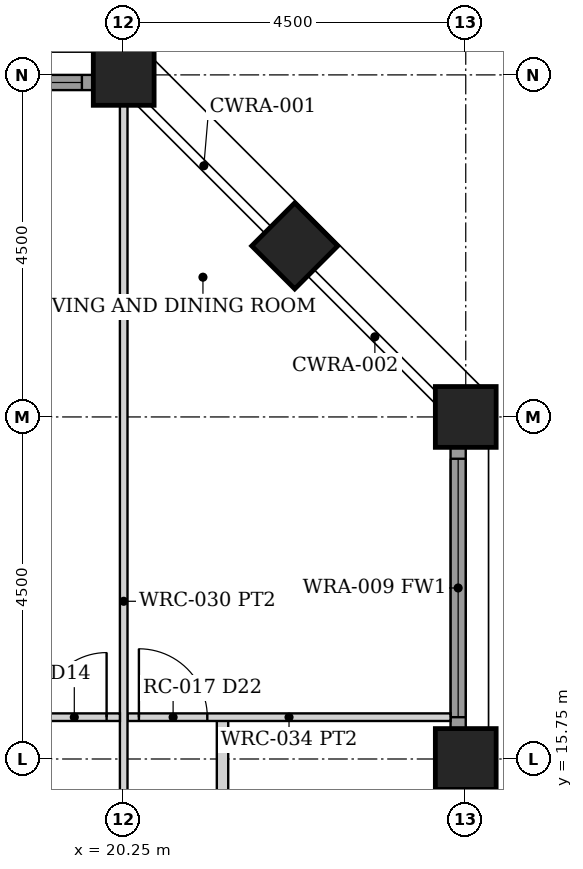
"""IFC4 building model, lengths in metres.
Left out: names, types, materials, properties, quantities, classifications, styles, units other than length and angle.
Written with IfcOpenShell. Run it as: python <this file> out.ifc"""

import sys

from ifc_helpers import new_model, si_unit, direction, frame, frame_2d, origin, origin_2d, place, context, subcontext, project, spatial, rectangle, hollow_rectangle, extrude, element, fill, save


model = new_model("IFC4")
c1 = context("Model", 3, precision=1e-05, world=origin(), true_north=direction((0.0, 1.0)))
c2 = subcontext(c1, "Body", "Model", "MODEL_VIEW")
j1 = project(units=[si_unit("LENGTHUNIT", "METRE"), si_unit("PLANEANGLEUNIT", "RADIAN")], contexts=[c1])
p1 = place(None, origin())
s1 = spatial("IfcSite", under=j1, at=p1, CompositionType="ELEMENT")
p2 = place(p1, origin())
s2 = spatial("IfcBuilding", under=s1, at=p2, CompositionType="ELEMENT")
p3 = place(p2, frame((0.0, 0.0, 47.5)))
s3 = spatial("IfcBuildingStorey", under=s2, at=p3, CompositionType="ELEMENT", Elevation=47.5)
for number, where, z_axis, x_axis in (
    (1, (24.75, 15.75, 0.0), (0.0, 0.0, 1.0), (1.0, 0.0, 0.0)),
    (2, (20.25, 24.75, 0.0), (0.0, 0.0, 1.0), (0.0, 1.0, 0.0)),
    (3, (24.75, 20.25, 0.0), (0.0, 0.0, 1.0), (1.0, 0.0, 0.0)),
    (4, (22.5, 22.5, 0.0), (0.0, 0.0, 1.0), (0.707, 0.707, 0.0)),
):
    element("IfcColumn", number, at=place(p3, frame(where, z_axis=z_axis, x_axis=x_axis)), inside=s3, PredefinedType="COLUMN", context=c2, shape_type="SweptSolid", body=[
        extrude(hollow_rectangle(XDim=0.8, YDim=0.8, WallThickness=0.07, at=origin_2d()), origin(), (0.0, 0.0, 1.0), 3.5),
    ])
p4 = place(p3, frame((24.65, 16.155, 0.0), z_axis=(0.0, 0.0, 1.0), x_axis=(0.0, 1.0, 0.0)))
e5 = element("IfcWall", 5, at=p4, inside=s3, PredefinedType="SOLIDWALL", context=c2, shape_type="SweptSolid", body=[
    extrude(rectangle(XDim=3.69, YDim=0.2, at=frame_2d((1.845, 0.0))), origin(), (0.0, 0.0, 1.0), 2.379),
])
p5 = place(p4, frame((0.145, 0.0, 0.3)))
e6 = element("IfcOpeningElement", 6, at=p5, cuts=e5, PredefinedType="OPENING", context=c2, shape_type="SweptSolid", body=[
    extrude(rectangle(XDim=3.4, YDim=1.929, at=frame_2d((1.7, 0.964))), frame((0.0, 0.11, 0.0), z_axis=(0.0, -1.0, 0.0), x_axis=(1.0, 0.0, 0.0)), (0.0, 0.0, 1.0), 0.22),
])
p6 = place(p3, frame((16.155, 24.65, 0.0), z_axis=(0.0, 0.0, 1.0), x_axis=(1.0, 0.0, 0.0)))
e7 = element("IfcWall", 7, at=p6, inside=s3, PredefinedType="SOLIDWALL", context=c2, shape_type="SweptSolid", body=[
    extrude(rectangle(XDim=3.69, YDim=0.2, at=frame_2d((1.845, 0.0))), origin(), (0.0, 0.0, 1.0), 2.379),
])
p7 = place(p6, frame((0.145, 0.0, 0.3)))
e8 = element("IfcOpeningElement", 8, at=p7, cuts=e7, PredefinedType="OPENING", context=c2, shape_type="SweptSolid", body=[
    extrude(rectangle(XDim=3.4, YDim=1.929, at=frame_2d((1.7, 0.964))), frame((0.0, 0.11, 0.0), z_axis=(0.0, -1.0, 0.0), x_axis=(1.0, 0.0, 0.0)), (0.0, 0.0, 1.0), 0.22),
])
p8 = place(p3, frame((21.55, 11.3, 0.0), z_axis=(0.0, 0.0, 1.0), x_axis=(0.0, 1.0, 0.0)))
e9 = element("IfcWall", 9, at=p8, inside=s3, PredefinedType="PARTITIONING", context=c2, shape_type="SweptSolid", body=[
    extrude(rectangle(XDim=5.0, YDim=0.15, at=frame_2d((2.5, 0.0))), origin(), (0.0, 0.0, 1.0), 2.373),
])
p9 = place(p8, frame((2.05, 0.0, 0.0)))
e10 = element("IfcOpeningElement", 10, at=p9, cuts=e9, PredefinedType="OPENING", context=c2, shape_type="SweptSolid", body=[
    extrude(rectangle(XDim=0.9, YDim=2.1, at=frame_2d((0.45, 1.05))), frame((0.0, 0.085, 0.0), z_axis=(0.0, -1.0, 0.0), x_axis=(1.0, 0.0, 0.0)), (0.0, 0.0, 1.0), 0.17),
])
p10 = place(p3, frame((20.3, 16.3, 0.0), z_axis=(0.0, 0.0, 1.0), x_axis=(1.0, 0.0, 0.0)))
e11 = element("IfcWall", 11, at=p10, inside=s3, PredefinedType="PARTITIONING", context=c2, shape_type="SweptSolid", body=[
    extrude(rectangle(XDim=4.25, YDim=0.1, at=frame_2d((2.125, 0.0))), origin(), (0.0, 0.0, 1.0), 2.373),
])
p11 = place(p10, frame((0.15, 0.0, 0.0)))
e12 = element("IfcOpeningElement", 12, at=p11, cuts=e11, PredefinedType="OPENING", context=c2, shape_type="SweptSolid", body=[
    extrude(rectangle(XDim=0.9, YDim=2.1, at=frame_2d((0.45, 1.05))), frame((0.0, 0.06, 0.0), z_axis=(0.0, -1.0, 0.0), x_axis=(1.0, 0.0, 0.0)), (0.0, 0.0, 1.0), 0.12),
])
p12 = place(p3, frame((20.25, 11.3, 0.0), z_axis=(0.0, 0.0, 1.0), x_axis=(0.0, 1.0, 0.0)))
e13 = element("IfcWall", 13, at=p12, inside=s3, PredefinedType="PARTITIONING", context=c2, shape_type="SweptSolid", body=[
    extrude(rectangle(XDim=13.05, YDim=0.1, at=frame_2d((6.525, 0.0))), origin(), (0.0, 0.0, 1.0), 2.373),
])
p13 = place(p3, frame((15.81, 16.3, 0.0), z_axis=(0.0, 0.0, 1.0), x_axis=(1.0, 0.0, 0.0)))
e14 = element("IfcWall", 14, at=p13, inside=s3, PredefinedType="PARTITIONING", context=c2, shape_type="SweptSolid", body=[
    extrude(rectangle(XDim=4.39, YDim=0.1, at=frame_2d((2.195, 0.0))), origin(), (0.0, 0.0, 1.0), 2.373),
])
p14 = place(p13, frame((3.365, 0.0, 0.0)))
e15 = element("IfcOpeningElement", 15, at=p14, cuts=e14, PredefinedType="OPENING", context=c2, shape_type="SweptSolid", body=[
    extrude(rectangle(XDim=0.85, YDim=2.1, at=frame_2d((0.425, 1.05))), frame((0.0, 0.06, 0.0), z_axis=(0.0, -1.0, 0.0), x_axis=(1.0, 0.0, 0.0)), (0.0, 0.0, 1.0), 0.12),
])
p15 = place(p13, frame((1.13, 0.0, 0.0)))
e16 = element("IfcOpeningElement", 16, at=p15, cuts=e14, PredefinedType="OPENING", context=c2, shape_type="SweptSolid", body=[
    extrude(rectangle(XDim=0.8, YDim=2.1, at=frame_2d((0.4, 1.05))), frame((0.0, 0.06, 0.0), z_axis=(0.0, -1.0, 0.0), x_axis=(1.0, 0.0, 0.0)), (0.0, 0.0, 1.0), 0.12),
])
p16 = place(p5, origin())
e17 = element("IfcWindow", 17, at=p16, inside=s3, PartitioningType="SINGLE_PANEL", PredefinedType="WINDOW", context=c2, shape_type="SweptSolid", body=[
    extrude(rectangle(XDim=3.4, YDim=1.929, at=frame_2d((1.7, 0.964))), frame((0.0, 0.03, 0.0), z_axis=(0.0, -1.0, 0.0), x_axis=(1.0, 0.0, 0.0)), (0.0, 0.0, 1.0), 0.06),
])
fill(e6, e17)
p17 = place(p7, origin())
e18 = element("IfcWindow", 18, at=p17, inside=s3, PartitioningType="SINGLE_PANEL", PredefinedType="WINDOW", context=c2, shape_type="SweptSolid", body=[
    extrude(rectangle(XDim=3.4, YDim=1.929, at=frame_2d((1.7, 0.964))), frame((0.0, 0.03, 0.0), z_axis=(0.0, -1.0, 0.0), x_axis=(1.0, 0.0, 0.0)), (0.0, 0.0, 1.0), 0.06),
])
fill(e8, e18)
p18 = place(p11, origin())
e19 = element("IfcDoor", 19, at=p18, inside=s3, OperationType="SINGLE_SWING_LEFT", PredefinedType="DOOR", context=c2, shape_type="SweptSolid", body=[
    extrude(rectangle(XDim=0.9, YDim=2.1, at=frame_2d((0.45, 1.05))), frame((0.0, 0.025, 0.0), z_axis=(0.0, -1.0, 0.0), x_axis=(1.0, 0.0, 0.0)), (0.0, 0.0, 1.0), 0.05),
])
fill(e12, e19)
p19 = place(p14, origin())
e20 = element("IfcDoor", 20, at=p19, inside=s3, OperationType="SINGLE_SWING_RIGHT", PredefinedType="DOOR", context=c2, shape_type="SweptSolid", body=[
    extrude(rectangle(XDim=0.85, YDim=2.1, at=frame_2d((0.425, 1.05))), frame((0.0, 0.025, 0.0), z_axis=(0.0, -1.0, 0.0), x_axis=(1.0, 0.0, 0.0)), (0.0, 0.0, 1.0), 0.05),
])
fill(e15, e20)
save(model, sys.argv[1])
